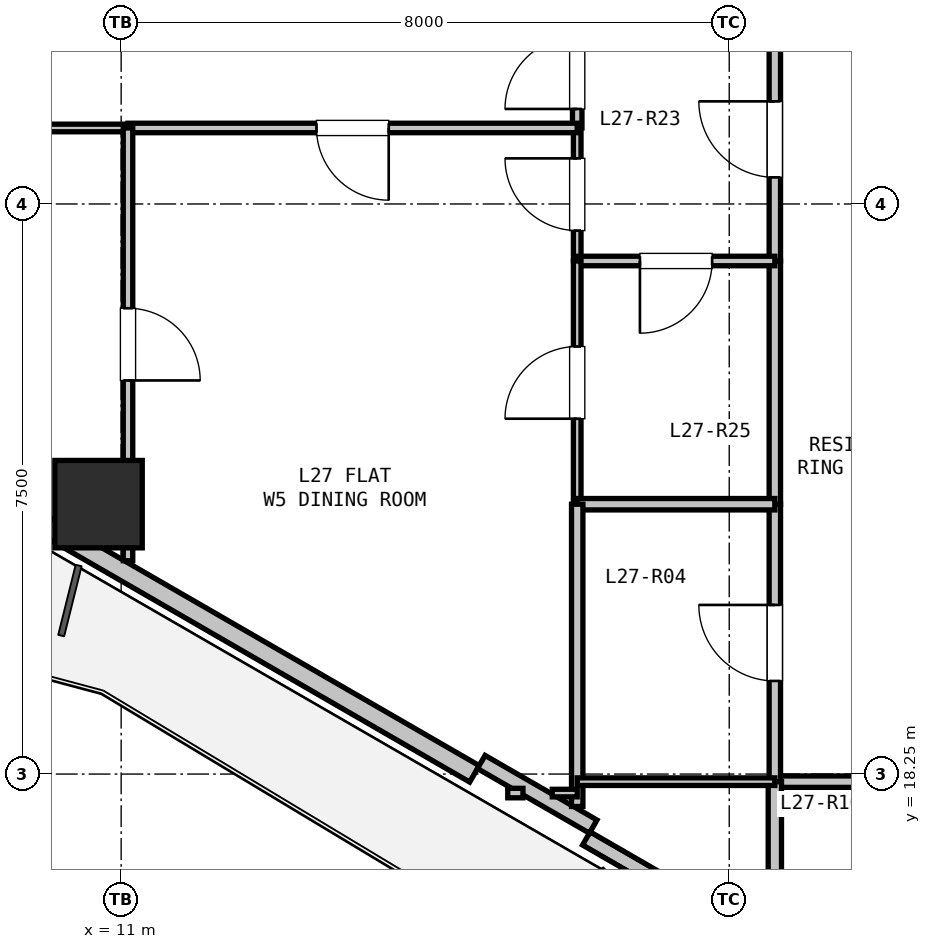
"""IFC4 building model, lengths in metres.
Left out: names, types, materials, properties, quantities, classifications, styles, units other than length and angle.
Written with IfcOpenShell. Run it as: python <this file> out.ifc"""

import sys

from ifc_helpers import new_model, si_unit, direction, frame, frame_2d, origin, origin_2d, place, context, subcontext, project, spatial, rectangle, hollow_rectangle, extrude, element, fill, save


model = new_model("IFC4")
c1 = context("Model", 3, precision=1e-05, world=origin(), true_north=direction((0.0, 1.0)))
c2 = subcontext(c1, "Body", "Model", "MODEL_VIEW")
j1 = project(units=[si_unit("LENGTHUNIT", "METRE"), si_unit("PLANEANGLEUNIT", "RADIAN")], contexts=[c1])
p1 = place(None, origin())
s1 = spatial("IfcSite", under=j1, at=p1, CompositionType="ELEMENT")
p2 = place(p1, origin())
s2 = spatial("IfcBuilding", under=s1, at=p2, CompositionType="ELEMENT")
p3 = place(p2, frame((0.0, 0.0, 99.9)))
s3 = spatial("IfcBuildingStorey", under=s2, at=p3, CompositionType="ELEMENT", Elevation=99.9)
p4 = place(p3, frame((10.702, 21.801, 0.0), z_axis=(0.0, 0.0, 1.0), x_axis=(1.0, 0.0, 0.0)))
e1 = element("IfcColumn", 1, at=p4, inside=s3, PredefinedType="COLUMN", context=c2, shape_type="SweptSolid", body=[
    extrude(hollow_rectangle(XDim=1.15, YDim=1.15, WallThickness=0.032, at=origin_2d()), origin(), (0.0, 0.0, 1.0), 3.3),
])
p5 = place(p3, frame((26.845, 11.788, 0.0), z_axis=(0.0, 0.0, 1.0), x_axis=(-0.866027010039, 0.499997217876, 0.0)))
e2 = element("IfcWall", 2, at=p5, inside=s3, PredefinedType="PARAPET", context=c2, shape_type="SweptSolid", body=[
    extrude(rectangle(XDim=11.229, YDim=0.2, at=frame_2d((5.615, 0.0))), origin(), (0.0, 0.0, 1.0), 0.2),
])
p6 = place(p3, frame((15.648, 18.253, 0.0), z_axis=(0.0, 0.0, 1.0), x_axis=(-0.866023023012, 0.500004123596, 0.0)))
e3 = element("IfcWall", 3, at=p6, inside=s3, PredefinedType="SOLIDWALL", context=c2, shape_type="SweptSolid", body=[
    extrude(rectangle(XDim=11.93, YDim=0.25, at=frame_2d((5.965, 0.0))), origin(), (0.0, 0.0, 1.0), 2.67),
])
p7 = place(p6, frame((8.071, 0.0, 0.9)))
e4 = element("IfcOpeningElement", 4, at=p7, cuts=e3, PredefinedType="OPENING", context=c2, shape_type="SweptSolid", body=[
    extrude(rectangle(XDim=1.2, YDim=1.4, at=frame_2d((0.6, 0.7))), frame((0.0, 0.135, 0.0), z_axis=(0.0, -1.0, 0.0), x_axis=(1.0, 0.0, 0.0)), (0.0, 0.0, 1.0), 0.27),
])
p8 = place(p3, frame((17.21, 17.559, 0.0), z_axis=(0.0, 0.0, 1.0), x_axis=(-0.866025371046, 0.500000056704, 0.0)))
e5 = element("IfcWall", 5, at=p8, inside=s3, PredefinedType="PARAPET", context=c2, shape_type="SweptSolid", body=[
    extrude(rectangle(XDim=1.7, YDim=0.2, at=frame_2d((0.85, 0.0))), origin(), (0.0, 0.0, 1.0), 2.67),
])
p9 = place(p3, frame((21.6, 18.15, 0.0), z_axis=(0.0, 0.0, 1.0), x_axis=(-1.0, 0.0, 0.0)))
e6 = element("IfcWall", 6, at=p9, inside=s3, PredefinedType="PARTITIONING", context=c2, shape_type="SweptSolid", body=[
    extrude(rectangle(XDim=2.0, YDim=0.15, at=frame_2d((1.0, 0.0))), origin(), (0.0, 0.0, 1.0), 3.05),
])
p10 = place(p3, frame((19.6, 18.15, 0.0), z_axis=(0.0, 0.0, 1.0), x_axis=(0.0, 1.0, 0.0)))
e7 = element("IfcWall", 7, at=p10, inside=s3, PredefinedType="PARTITIONING", context=c2, shape_type="SweptSolid", body=[
    extrude(rectangle(XDim=3.65, YDim=0.15, at=frame_2d((1.825, 0.0))), origin(), (0.0, 0.0, 1.0), 2.423),
])
p11 = place(p10, frame((1.325, 0.0, 0.0)))
e8 = element("IfcOpeningElement", 8, at=p11, cuts=e7, PredefinedType="OPENING", context=c2, shape_type="SweptSolid", body=[
    extrude(rectangle(XDim=1.0, YDim=2.15, at=frame_2d((0.5, 1.075))), frame((0.0, 0.085, 0.0), z_axis=(0.0, -1.0, 0.0), x_axis=(1.0, 0.0, 0.0)), (0.0, 0.0, 1.0), 0.17),
])
p12 = place(p3, frame((19.6, 21.8, 0.0), z_axis=(0.0, 0.0, 1.0), x_axis=(0.0, 1.0, 0.0)))
e9 = element("IfcWall", 9, at=p12, inside=s3, PredefinedType="PARTITIONING", context=c2, shape_type="SweptSolid", body=[
    extrude(rectangle(XDim=3.2, YDim=0.15, at=frame_2d((1.6, 0.0))), origin(), (0.0, 0.0, 1.0), 3.05),
])
p13 = place(p3, frame((19.6, 25.0, 0.0), z_axis=(0.0, 0.0, 1.0), x_axis=(0.0, 1.0, 0.0)))
e10 = element("IfcWall", 10, at=p13, inside=s3, PredefinedType="PARTITIONING", context=c2, shape_type="SweptSolid", body=[
    extrude(rectangle(XDim=3.2, YDim=0.15, at=frame_2d((1.6, 0.0))), origin(), (0.0, 0.0, 1.0), 3.05),
])
p14 = place(p13, frame((1.1, 0.0, 0.0)))
e11 = element("IfcOpeningElement", 11, at=p14, cuts=e10, PredefinedType="OPENING", context=c2, shape_type="SweptSolid", body=[
    extrude(rectangle(XDim=1.0, YDim=2.15, at=frame_2d((0.5, 1.075))), frame((0.0, 0.085, 0.0), z_axis=(0.0, -1.0, 0.0), x_axis=(1.0, 0.0, 0.0)), (0.0, 0.0, 1.0), 0.17),
])
p15 = place(p3, frame((17.0, 25.0, 0.0), z_axis=(0.0, 0.0, 1.0), x_axis=(0.0, 1.0, 0.0)))
e12 = element("IfcWall", 12, at=p15, inside=s3, PredefinedType="PARTITIONING", context=c2, shape_type="SweptSolid", body=[
    extrude(rectangle(XDim=1.75, YDim=0.1, at=frame_2d((0.875, 0.0))), origin(), (0.0, 0.0, 1.0), 3.05),
])
p16 = place(p15, frame((0.4, 0.0, 0.0)))
e13 = element("IfcOpeningElement", 13, at=p16, cuts=e12, PredefinedType="OPENING", context=c2, shape_type="SweptSolid", body=[
    extrude(rectangle(XDim=0.95, YDim=2.1, at=frame_2d((0.475, 1.05))), frame((0.0, 0.06, 0.0), z_axis=(0.0, -1.0, 0.0), x_axis=(1.0, 0.0, 0.0)), (0.0, 0.0, 1.0), 0.12),
])
p17 = place(p3, frame((17.0, 26.75, 0.0), z_axis=(0.0, 0.0, 1.0), x_axis=(0.0, 1.0, 0.0)))
e14 = element("IfcWall", 14, at=p17, inside=s3, PredefinedType="PARTITIONING", context=c2, shape_type="SweptSolid", body=[
    extrude(rectangle(XDim=1.45, YDim=0.125, at=frame_2d((0.725, 0.0))), origin(), (0.0, 0.0, 1.0), 3.05),
])
p18 = place(p17, frame((0.25, 0.0, 0.0)))
e15 = element("IfcOpeningElement", 15, at=p18, cuts=e14, PredefinedType="OPENING", context=c2, shape_type="SweptSolid", body=[
    extrude(rectangle(XDim=0.95, YDim=2.1, at=frame_2d((0.475, 1.05))), frame((0.0, 0.073, 0.0), z_axis=(0.0, -1.0, 0.0), x_axis=(1.0, 0.0, 0.0)), (0.0, 0.0, 1.0), 0.145),
])
p19 = place(p3, frame((19.6, 25.0, 0.0), z_axis=(0.0, 0.0, 1.0), x_axis=(-1.0, 0.0, 0.0)))
e16 = element("IfcWall", 16, at=p19, inside=s3, PredefinedType="PARTITIONING", context=c2, shape_type="SweptSolid", body=[
    extrude(rectangle(XDim=2.6, YDim=0.125, at=frame_2d((1.3, 0.0))), origin(), (0.0, 0.0, 1.0), 3.05),
])
p20 = place(p19, frame((0.825, 0.0, 0.0)))
e17 = element("IfcOpeningElement", 17, at=p20, cuts=e16, PredefinedType="OPENING", context=c2, shape_type="SweptSolid", body=[
    extrude(rectangle(XDim=0.95, YDim=2.1, at=frame_2d((0.475, 1.05))), frame((0.0, 0.073, 0.0), z_axis=(0.0, -1.0, 0.0), x_axis=(1.0, 0.0, 0.0)), (0.0, 0.0, 1.0), 0.145),
])
p21 = place(p3, frame((19.6, 16.013, 0.0), z_axis=(0.0, 0.0, 1.0), x_axis=(0.0, 1.0, 0.0)))
e18 = element("IfcWall", 18, at=p21, inside=s3, PredefinedType="PLUMBINGWALL", context=c2, shape_type="SweptSolid", body=[
    extrude(rectangle(XDim=2.137, YDim=0.175, at=frame_2d((1.068, 0.0))), origin(), (0.0, 0.0, 1.0), 2.365),
])
p22 = place(p3, frame((17.0, 21.8, 0.0), z_axis=(0.0, 0.0, 1.0), x_axis=(0.0, 1.0, 0.0)))
e19 = element("IfcWall", 19, at=p22, inside=s3, PredefinedType="PARTITIONING", context=c2, shape_type="SweptSolid", body=[
    extrude(rectangle(XDim=3.2, YDim=0.1, at=frame_2d((1.6, 0.0))), origin(), (0.0, 0.0, 1.0), 2.423),
])
p23 = place(p22, frame((1.125, 0.0, 0.0)))
e20 = element("IfcOpeningElement", 20, at=p23, cuts=e19, PredefinedType="OPENING", context=c2, shape_type="SweptSolid", body=[
    extrude(rectangle(XDim=0.95, YDim=2.1, at=frame_2d((0.475, 1.05))), frame((0.0, 0.06, 0.0), z_axis=(0.0, -1.0, 0.0), x_axis=(1.0, 0.0, 0.0)), (0.0, 0.0, 1.0), 0.12),
])
p24 = place(p3, frame((19.6, 21.8, 0.0), z_axis=(0.0, 0.0, 1.0), x_axis=(-1.0, 0.0, 0.0)))
e21 = element("IfcWall", 21, at=p24, inside=s3, PredefinedType="PARTITIONING", context=c2, shape_type="SweptSolid", body=[
    extrude(rectangle(XDim=2.6, YDim=0.15, at=frame_2d((1.3, 0.0))), origin(), (0.0, 0.0, 1.0), 2.423),
])
p25 = place(p3, frame((17.0, 17.823, 0.0), z_axis=(0.0, 0.0, 1.0), x_axis=(0.0, 1.0, 0.0)))
e22 = element("IfcWall", 22, at=p25, inside=s3, PredefinedType="PARTITIONING", context=c2, shape_type="SweptSolid", body=[
    extrude(rectangle(XDim=3.977, YDim=0.15, at=frame_2d((1.988, 0.0))), origin(), (0.0, 0.0, 1.0), 2.365),
])
p26 = place(p3, frame((19.6, 18.15, 0.0), z_axis=(0.0, 0.0, 1.0), x_axis=(-1.0, 0.0, 0.0)))
e23 = element("IfcWall", 23, at=p26, inside=s3, PredefinedType="PARTITIONING", context=c2, shape_type="SweptSolid", body=[
    extrude(rectangle(XDim=2.6, YDim=0.1, at=frame_2d((1.3, 0.0))), origin(), (0.0, 0.0, 1.0), 2.365),
])
p27 = place(p3, frame((17.0, 26.75, 0.0), z_axis=(0.0, 0.0, 1.0), x_axis=(-1.0, 0.0, 0.0)))
e24 = element("IfcWall", 24, at=p27, inside=s3, PredefinedType="PARTITIONING", context=c2, shape_type="SweptSolid", body=[
    extrude(rectangle(XDim=5.91, YDim=0.125, at=frame_2d((2.955, 0.0))), origin(), (0.0, 0.0, 1.0), 3.05),
])
p28 = place(p27, frame((2.48, 0.0, 0.0)))
e25 = element("IfcOpeningElement", 25, at=p28, cuts=e24, PredefinedType="OPENING", context=c2, shape_type="SweptSolid", body=[
    extrude(rectangle(XDim=0.95, YDim=2.1, at=frame_2d((0.475, 1.05))), frame((0.0, 0.073, 0.0), z_axis=(0.0, -1.0, 0.0), x_axis=(1.0, 0.0, 0.0)), (0.0, 0.0, 1.0), 0.145),
])
p29 = place(p3, frame((11.09, 26.75, 0.0), z_axis=(0.0, 0.0, 1.0), x_axis=(-1.0, 0.0, 0.0)))
e26 = element("IfcWall", 26, at=p29, inside=s3, PredefinedType="PARTITIONING", context=c2, shape_type="SweptSolid", body=[
    extrude(rectangle(XDim=5.754, YDim=0.1, at=frame_2d((2.877, 0.0))), origin(), (0.0, 0.0, 1.0), 2.715),
])
p30 = place(p29, frame((2.402, 0.0, 0.0)))
e27 = element("IfcOpeningElement", 27, at=p30, cuts=e26, PredefinedType="OPENING", context=c2, shape_type="SweptSolid", body=[
    extrude(rectangle(XDim=0.95, YDim=2.1, at=frame_2d((0.475, 1.05))), frame((0.0, 0.06, 0.0), z_axis=(0.0, -1.0, 0.0), x_axis=(1.0, 0.0, 0.0)), (0.0, 0.0, 1.0), 0.12),
])
p31 = place(p3, frame((11.09, 26.75, 0.0), z_axis=(0.0, 0.0, 1.0), x_axis=(0.0, -1.0, 0.0)))
e28 = element("IfcWall", 28, at=p31, inside=s3, PredefinedType="PARTITIONING", context=c2, shape_type="SweptSolid", body=[
    extrude(rectangle(XDim=5.693, YDim=0.125, at=frame_2d((2.847, 0.0))), origin(), (0.0, 0.0, 1.0), 2.423),
])
p32 = place(p31, frame((2.372, 0.0, 0.0)))
e29 = element("IfcOpeningElement", 29, at=p32, cuts=e28, PredefinedType="OPENING", context=c2, shape_type="SweptSolid", body=[
    extrude(rectangle(XDim=0.95, YDim=2.1, at=frame_2d((0.475, 1.05))), frame((0.0, 0.073, 0.0), z_axis=(0.0, -1.0, 0.0), x_axis=(1.0, 0.0, 0.0)), (0.0, 0.0, 1.0), 0.145),
])
p33 = place(p3, frame((17.0, 18.0, 0.0), z_axis=(0.0, 0.0, 1.0), x_axis=(-1.0, 0.0, 0.0)))
e30 = element("IfcWall", 30, at=p33, inside=s3, PredefinedType="PARTITIONING", context=c2, shape_type="SweptSolid", body=[
    extrude(rectangle(XDim=0.328, YDim=0.1, at=frame_2d((0.164, 0.0))), origin(), (0.0, 0.0, 1.0), 2.715),
])
p34 = place(p3, frame((16.286, 18.0, 0.0), z_axis=(0.0, 0.0, 1.0), x_axis=(-1.0, 0.0, 0.0)))
e31 = element("IfcWall", 31, at=p34, inside=s3, PredefinedType="PARTITIONING", context=c2, shape_type="SweptSolid", body=[
    extrude(rectangle(XDim=0.2, YDim=0.125, at=frame_2d((0.1, 0.0))), origin(), (0.0, 0.0, 1.0), 3.05),
])
p35 = place(p14, origin())
e32 = element("IfcDoor", 32, at=p35, inside=s3, OperationType="SINGLE_SWING_RIGHT", PredefinedType="DOOR", context=c2, shape_type="SweptSolid", body=[
    extrude(rectangle(XDim=1.0, YDim=2.15, at=frame_2d((0.5, 1.075))), frame((0.0, 0.025, 0.0), z_axis=(0.0, -1.0, 0.0), x_axis=(1.0, 0.0, 0.0)), (0.0, 0.0, 1.0), 0.05),
])
fill(e11, e32)
p36 = place(p11, origin())
e33 = element("IfcDoor", 33, at=p36, inside=s3, OperationType="SINGLE_SWING_RIGHT", PredefinedType="DOOR", context=c2, shape_type="SweptSolid", body=[
    extrude(rectangle(XDim=1.0, YDim=2.15, at=frame_2d((0.5, 1.075))), frame((0.0, 0.025, 0.0), z_axis=(0.0, -1.0, 0.0), x_axis=(1.0, 0.0, 0.0)), (0.0, 0.0, 1.0), 0.05),
])
fill(e8, e33)
p37 = place(p20, origin())
e34 = element("IfcDoor", 34, at=p37, inside=s3, OperationType="SINGLE_SWING_RIGHT", PredefinedType="DOOR", context=c2, shape_type="SweptSolid", body=[
    extrude(rectangle(XDim=0.95, YDim=2.1, at=frame_2d((0.475, 1.05))), frame((0.0, 0.025, 0.0), z_axis=(0.0, -1.0, 0.0), x_axis=(1.0, 0.0, 0.0)), (0.0, 0.0, 1.0), 0.05),
])
fill(e17, e34)
p38 = place(p18, origin())
e35 = element("IfcDoor", 35, at=p38, inside=s3, OperationType="SINGLE_SWING_LEFT", PredefinedType="DOOR", context=c2, shape_type="SweptSolid", body=[
    extrude(rectangle(XDim=0.95, YDim=2.1, at=frame_2d((0.475, 1.05))), frame((0.0, 0.025, 0.0), z_axis=(0.0, -1.0, 0.0), x_axis=(1.0, 0.0, 0.0)), (0.0, 0.0, 1.0), 0.05),
])
fill(e15, e35)
p39 = place(p16, origin())
e36 = element("IfcDoor", 36, at=p39, inside=s3, OperationType="SINGLE_SWING_RIGHT", PredefinedType="DOOR", context=c2, shape_type="SweptSolid", body=[
    extrude(rectangle(XDim=0.95, YDim=2.1, at=frame_2d((0.475, 1.05))), frame((0.0, 0.025, 0.0), z_axis=(0.0, -1.0, 0.0), x_axis=(1.0, 0.0, 0.0)), (0.0, 0.0, 1.0), 0.05),
])
fill(e13, e36)
p40 = place(p23, origin())
e37 = element("IfcDoor", 37, at=p40, inside=s3, OperationType="SINGLE_SWING_LEFT", PredefinedType="DOOR", context=c2, shape_type="SweptSolid", body=[
    extrude(rectangle(XDim=0.95, YDim=2.1, at=frame_2d((0.475, 1.05))), frame((0.0, 0.025, 0.0), z_axis=(0.0, -1.0, 0.0), x_axis=(1.0, 0.0, 0.0)), (0.0, 0.0, 1.0), 0.05),
])
fill(e20, e37)
p41 = place(p28, origin())
e38 = element("IfcDoor", 38, at=p41, inside=s3, OperationType="SINGLE_SWING_LEFT", PredefinedType="DOOR", context=c2, shape_type="SweptSolid", body=[
    extrude(rectangle(XDim=0.95, YDim=2.1, at=frame_2d((0.475, 1.05))), frame((0.0, 0.025, 0.0), z_axis=(0.0, -1.0, 0.0), x_axis=(1.0, 0.0, 0.0)), (0.0, 0.0, 1.0), 0.05),
])
fill(e25, e38)
p42 = place(p32, origin())
e39 = element("IfcDoor", 39, at=p42, inside=s3, OperationType="SINGLE_SWING_RIGHT", PredefinedType="DOOR", context=c2, shape_type="SweptSolid", body=[
    extrude(rectangle(XDim=0.95, YDim=2.1, at=frame_2d((0.475, 1.05))), frame((0.0, 0.025, 0.0), z_axis=(0.0, -1.0, 0.0), x_axis=(1.0, 0.0, 0.0)), (0.0, 0.0, 1.0), 0.05),
])
fill(e29, e39)
save(model, sys.argv[1])
